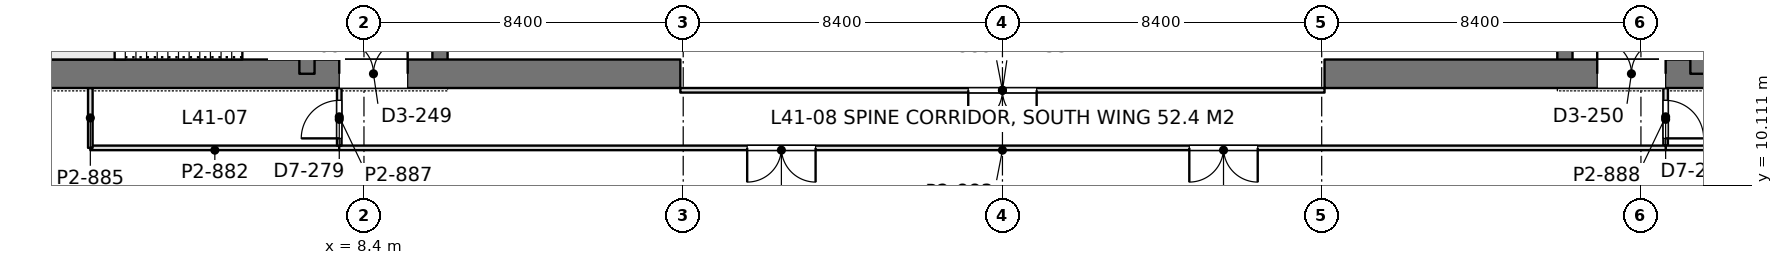
"""IFC4 building model, lengths in metres.
Left out: names, types, materials, properties, quantities, classifications, styles, units other than length and angle.
Written with IfcOpenShell. Run it as: python <this file> out.ifc"""

import sys

from ifc_helpers import new_model, si_unit, direction, frame, frame_2d, origin, place, context, subcontext, project, spatial, rectangle, extrude, element, fill, save


model = new_model("IFC4")
c1 = context("Model", 3, precision=1e-05, world=origin(), true_north=direction((0.0, 1.0)))
c2 = subcontext(c1, "Body", "Model", "MODEL_VIEW")
j1 = project(units=[si_unit("LENGTHUNIT", "METRE"), si_unit("PLANEANGLEUNIT", "RADIAN")], contexts=[c1])
p1 = place(None, origin())
s1 = spatial("IfcSite", under=j1, at=p1, CompositionType="ELEMENT")
p2 = place(p1, origin())
s2 = spatial("IfcBuilding", under=s1, at=p2, CompositionType="ELEMENT")
p3 = place(p2, frame((0.0, 0.0, 181.8)))
s3 = spatial("IfcBuildingStorey", under=s2, at=p3, CompositionType="ELEMENT", Elevation=181.8)
p4 = place(p3, frame((-1.125, 13.05, 0.0), z_axis=(0.0, 0.0, 1.0), x_axis=(1.0, 0.0, 0.0)))
e1 = element("IfcWall", 1, at=p4, inside=s3, PredefinedType="SHEAR", context=c2, shape_type="SweptSolid", body=[
    extrude(rectangle(XDim=17.85, YDim=0.75, at=frame_2d((8.925, 0.0))), origin(), (0.0, 0.0, 1.0), 4.2),
])
p5 = place(p4, frame((8.875, 0.0, 0.0)))
e2 = element("IfcOpeningElement", 2, at=p5, cuts=e1, PredefinedType="OPENING", context=c2, shape_type="SweptSolid", body=[
    extrude(rectangle(XDim=1.8, YDim=2.4, at=frame_2d((0.9, 1.2))), frame((0.0, 0.385, 0.0), z_axis=(0.0, -1.0, 0.0), x_axis=(1.0, 0.0, 0.0)), (0.0, 0.0, 1.0), 0.77),
])
p6 = place(p3, frame((6.9, 13.05, 0.0), z_axis=(0.0, 0.0, 1.0), x_axis=(0.0, 1.0, 0.0)))
e3 = element("IfcWall", 3, at=p6, inside=s3, PredefinedType="SHEAR", context=c2, shape_type="SweptSolid", body=[
    extrude(rectangle(XDim=24.3, YDim=0.4, at=frame_2d((12.15, 0.0))), origin(), (0.0, 0.0, 1.0), 4.2),
])
p7 = place(p6, frame((1.3, 0.0, 0.0)))
e4 = element("IfcOpeningElement", 4, at=p7, cuts=e3, PredefinedType="OPENING", context=c2, shape_type="SweptSolid", body=[
    extrude(rectangle(XDim=1.0, YDim=2.2, at=frame_2d((0.5, 1.1))), frame((0.0, 0.21, 0.0), z_axis=(0.0, -1.0, 0.0), x_axis=(1.0, 0.0, 0.0)), (0.0, 0.0, 1.0), 0.42),
])
p8 = place(p6, frame((22.0, 0.0, 0.0)))
e5 = element("IfcOpeningElement", 5, at=p8, cuts=e3, PredefinedType="OPENING", context=c2, shape_type="SweptSolid", body=[
    extrude(rectangle(XDim=1.0, YDim=2.2, at=frame_2d((0.5, 1.1))), frame((0.0, 0.21, 0.0), z_axis=(0.0, -1.0, 0.0), x_axis=(1.0, 0.0, 0.0)), (0.0, 0.0, 1.0), 0.42),
])
p9 = place(p6, frame((5.55, 0.0, 0.0)))
e6 = element("IfcOpeningElement", 6, at=p9, cuts=e3, PredefinedType="OPENING", context=c2, shape_type="SweptSolid", body=[
    extrude(rectangle(XDim=1.0, YDim=2.2, at=frame_2d((0.5, 1.1))), frame((0.0, 0.21, 0.0), z_axis=(0.0, -1.0, 0.0), x_axis=(1.0, 0.0, 0.0)), (0.0, 0.0, 1.0), 0.42),
])
p10 = place(p6, frame((9.55, 0.0, 0.0)))
e7 = element("IfcOpeningElement", 7, at=p10, cuts=e3, PredefinedType="OPENING", context=c2, shape_type="SweptSolid", body=[
    extrude(rectangle(XDim=1.0, YDim=2.2, at=frame_2d((0.5, 1.1))), frame((0.0, 0.21, 0.0), z_axis=(0.0, -1.0, 0.0), x_axis=(1.0, 0.0, 0.0)), (0.0, 0.0, 1.0), 0.42),
])
p11 = place(p6, frame((12.8, 0.0, 0.0)))
e8 = element("IfcOpeningElement", 8, at=p11, cuts=e3, PredefinedType="OPENING", context=c2, shape_type="SweptSolid", body=[
    extrude(rectangle(XDim=1.1, YDim=2.2, at=frame_2d((0.55, 1.1))), frame((0.0, 0.21, 0.0), z_axis=(0.0, -1.0, 0.0), x_axis=(1.0, 0.0, 0.0)), (0.0, 0.0, 1.0), 0.42),
])
p12 = place(p6, frame((15.538, 0.0, 0.0)))
e9 = element("IfcOpeningElement", 9, at=p12, cuts=e3, PredefinedType="OPENING", context=c2, shape_type="SweptSolid", body=[
    extrude(rectangle(XDim=1.1, YDim=2.2, at=frame_2d((0.55, 1.1))), frame((0.0, 0.21, 0.0), z_axis=(0.0, -1.0, 0.0), x_axis=(1.0, 0.0, 0.0)), (0.0, 0.0, 1.0), 0.42),
])
p13 = place(p6, frame((18.262, 0.0, 0.0)))
e10 = element("IfcOpeningElement", 10, at=p13, cuts=e3, PredefinedType="OPENING", context=c2, shape_type="SweptSolid", body=[
    extrude(rectangle(XDim=1.1, YDim=2.2, at=frame_2d((0.55, 1.1))), frame((0.0, 0.21, 0.0), z_axis=(0.0, -1.0, 0.0), x_axis=(1.0, 0.0, 0.0)), (0.0, 0.0, 1.0), 0.42),
])
p14 = place(p3, frame((10.4, 13.05, 0.0), z_axis=(0.0, 0.0, 1.0), x_axis=(0.0, 1.0, 0.0)))
e11 = element("IfcWall", 11, at=p14, inside=s3, PredefinedType="SHEAR", context=c2, shape_type="SweptSolid", body=[
    extrude(rectangle(XDim=24.3, YDim=0.4, at=frame_2d((12.15, 0.0))), origin(), (0.0, 0.0, 1.0), 4.2),
])
p15 = place(p14, frame((15.75, 0.0, 0.0)))
e12 = element("IfcOpeningElement", 12, at=p15, cuts=e11, PredefinedType="OPENING", context=c2, shape_type="SweptSolid", body=[
    extrude(rectangle(XDim=1.1, YDim=2.2, at=frame_2d((0.55, 1.1))), frame((0.0, 0.21, 0.0), z_axis=(0.0, -1.0, 0.0), x_axis=(1.0, 0.0, 0.0)), (0.0, 0.0, 1.0), 0.42),
])
p16 = place(p14, frame((18.6, 0.0, 0.0)))
e13 = element("IfcOpeningElement", 13, at=p16, cuts=e11, PredefinedType="OPENING", context=c2, shape_type="SweptSolid", body=[
    extrude(rectangle(XDim=1.1, YDim=2.2, at=frame_2d((0.55, 1.1))), frame((0.0, 0.21, 0.0), z_axis=(0.0, -1.0, 0.0), x_axis=(1.0, 0.0, 0.0)), (0.0, 0.0, 1.0), 0.42),
])
p17 = place(p14, frame((21.45, 0.0, 0.0)))
e14 = element("IfcOpeningElement", 14, at=p17, cuts=e11, PredefinedType="OPENING", context=c2, shape_type="SweptSolid", body=[
    extrude(rectangle(XDim=1.1, YDim=2.2, at=frame_2d((0.55, 1.1))), frame((0.0, 0.21, 0.0), z_axis=(0.0, -1.0, 0.0), x_axis=(1.0, 0.0, 0.0)), (0.0, 0.0, 1.0), 0.42),
])
p18 = place(p14, frame((8.65, 0.0, 0.0)))
e15 = element("IfcOpeningElement", 15, at=p18, cuts=e11, PredefinedType="OPENING", context=c2, shape_type="SweptSolid", body=[
    extrude(rectangle(XDim=1.8, YDim=2.4, at=frame_2d((0.9, 1.2))), frame((0.0, 0.21, 0.0), z_axis=(0.0, -1.0, 0.0), x_axis=(1.0, 0.0, 0.0)), (0.0, 0.0, 1.0), 0.42),
])
p19 = place(p3, frame((33.675, 13.05, 0.0), z_axis=(0.0, 0.0, 1.0), x_axis=(1.0, 0.0, 0.0)))
e16 = element("IfcWall", 16, at=p19, inside=s3, PredefinedType="SHEAR", context=c2, shape_type="SweptSolid", body=[
    extrude(rectangle(XDim=17.85, YDim=0.75, at=frame_2d((8.925, 0.0))), origin(), (0.0, 0.0, 1.0), 4.2),
])
p20 = place(p19, frame((7.175, 0.0, 0.0)))
e17 = element("IfcOpeningElement", 17, at=p20, cuts=e16, PredefinedType="OPENING", context=c2, shape_type="SweptSolid", body=[
    extrude(rectangle(XDim=1.8, YDim=2.4, at=frame_2d((0.9, 1.2))), frame((0.0, 0.385, 0.0), z_axis=(0.0, -1.0, 0.0), x_axis=(1.0, 0.0, 0.0)), (0.0, 0.0, 1.0), 0.77),
])
p21 = place(p3, frame((43.5, 13.05, 0.0), z_axis=(0.0, 0.0, 1.0), x_axis=(0.0, 1.0, 0.0)))
e18 = element("IfcWall", 18, at=p21, inside=s3, PredefinedType="SHEAR", context=c2, shape_type="SweptSolid", body=[
    extrude(rectangle(XDim=24.3, YDim=0.4, at=frame_2d((12.15, 0.0))), origin(), (0.0, 0.0, 1.0), 4.2),
])
p22 = place(p21, frame((1.3, 0.0, 0.0)))
e19 = element("IfcOpeningElement", 19, at=p22, cuts=e18, PredefinedType="OPENING", context=c2, shape_type="SweptSolid", body=[
    extrude(rectangle(XDim=1.0, YDim=2.2, at=frame_2d((0.5, 1.1))), frame((0.0, 0.21, 0.0), z_axis=(0.0, -1.0, 0.0), x_axis=(1.0, 0.0, 0.0)), (0.0, 0.0, 1.0), 0.42),
])
p23 = place(p21, frame((22.0, 0.0, 0.0)))
e20 = element("IfcOpeningElement", 20, at=p23, cuts=e18, PredefinedType="OPENING", context=c2, shape_type="SweptSolid", body=[
    extrude(rectangle(XDim=1.0, YDim=2.2, at=frame_2d((0.5, 1.1))), frame((0.0, 0.21, 0.0), z_axis=(0.0, -1.0, 0.0), x_axis=(1.0, 0.0, 0.0)), (0.0, 0.0, 1.0), 0.42),
])
p24 = place(p21, frame((5.55, 0.0, 0.0)))
e21 = element("IfcOpeningElement", 21, at=p24, cuts=e18, PredefinedType="OPENING", context=c2, shape_type="SweptSolid", body=[
    extrude(rectangle(XDim=1.0, YDim=2.2, at=frame_2d((0.5, 1.1))), frame((0.0, 0.21, 0.0), z_axis=(0.0, -1.0, 0.0), x_axis=(1.0, 0.0, 0.0)), (0.0, 0.0, 1.0), 0.42),
])
p25 = place(p21, frame((9.55, 0.0, 0.0)))
e22 = element("IfcOpeningElement", 22, at=p25, cuts=e18, PredefinedType="OPENING", context=c2, shape_type="SweptSolid", body=[
    extrude(rectangle(XDim=1.0, YDim=2.2, at=frame_2d((0.5, 1.1))), frame((0.0, 0.21, 0.0), z_axis=(0.0, -1.0, 0.0), x_axis=(1.0, 0.0, 0.0)), (0.0, 0.0, 1.0), 0.42),
])
p26 = place(p21, frame((12.8, 0.0, 0.0)))
e23 = element("IfcOpeningElement", 23, at=p26, cuts=e18, PredefinedType="OPENING", context=c2, shape_type="SweptSolid", body=[
    extrude(rectangle(XDim=1.1, YDim=2.2, at=frame_2d((0.55, 1.1))), frame((0.0, 0.21, 0.0), z_axis=(0.0, -1.0, 0.0), x_axis=(1.0, 0.0, 0.0)), (0.0, 0.0, 1.0), 0.42),
])
p27 = place(p21, frame((15.538, 0.0, 0.0)))
e24 = element("IfcOpeningElement", 24, at=p27, cuts=e18, PredefinedType="OPENING", context=c2, shape_type="SweptSolid", body=[
    extrude(rectangle(XDim=1.1, YDim=2.2, at=frame_2d((0.55, 1.1))), frame((0.0, 0.21, 0.0), z_axis=(0.0, -1.0, 0.0), x_axis=(1.0, 0.0, 0.0)), (0.0, 0.0, 1.0), 0.42),
])
p28 = place(p21, frame((18.262, 0.0, 0.0)))
e25 = element("IfcOpeningElement", 25, at=p28, cuts=e18, PredefinedType="OPENING", context=c2, shape_type="SweptSolid", body=[
    extrude(rectangle(XDim=1.1, YDim=2.2, at=frame_2d((0.55, 1.1))), frame((0.0, 0.21, 0.0), z_axis=(0.0, -1.0, 0.0), x_axis=(1.0, 0.0, 0.0)), (0.0, 0.0, 1.0), 0.42),
])
p29 = place(p3, frame((40.0, 13.05, 0.0), z_axis=(0.0, 0.0, 1.0), x_axis=(0.0, 1.0, 0.0)))
e26 = element("IfcWall", 26, at=p29, inside=s3, PredefinedType="SHEAR", context=c2, shape_type="SweptSolid", body=[
    extrude(rectangle(XDim=24.3, YDim=0.4, at=frame_2d((12.15, 0.0))), origin(), (0.0, 0.0, 1.0), 4.2),
])
p30 = place(p29, frame((15.75, 0.0, 0.0)))
e27 = element("IfcOpeningElement", 27, at=p30, cuts=e26, PredefinedType="OPENING", context=c2, shape_type="SweptSolid", body=[
    extrude(rectangle(XDim=1.1, YDim=2.2, at=frame_2d((0.55, 1.1))), frame((0.0, 0.21, 0.0), z_axis=(0.0, -1.0, 0.0), x_axis=(1.0, 0.0, 0.0)), (0.0, 0.0, 1.0), 0.42),
])
p31 = place(p29, frame((18.6, 0.0, 0.0)))
e28 = element("IfcOpeningElement", 28, at=p31, cuts=e26, PredefinedType="OPENING", context=c2, shape_type="SweptSolid", body=[
    extrude(rectangle(XDim=1.1, YDim=2.2, at=frame_2d((0.55, 1.1))), frame((0.0, 0.21, 0.0), z_axis=(0.0, -1.0, 0.0), x_axis=(1.0, 0.0, 0.0)), (0.0, 0.0, 1.0), 0.42),
])
p32 = place(p29, frame((21.45, 0.0, 0.0)))
e29 = element("IfcOpeningElement", 29, at=p32, cuts=e26, PredefinedType="OPENING", context=c2, shape_type="SweptSolid", body=[
    extrude(rectangle(XDim=1.1, YDim=2.2, at=frame_2d((0.55, 1.1))), frame((0.0, 0.21, 0.0), z_axis=(0.0, -1.0, 0.0), x_axis=(1.0, 0.0, 0.0)), (0.0, 0.0, 1.0), 0.42),
])
p33 = place(p29, frame((8.65, 0.0, 0.0)))
e30 = element("IfcOpeningElement", 30, at=p33, cuts=e26, PredefinedType="OPENING", context=c2, shape_type="SweptSolid", body=[
    extrude(rectangle(XDim=1.8, YDim=2.4, at=frame_2d((0.9, 1.2))), frame((0.0, 0.21, 0.0), z_axis=(0.0, -1.0, 0.0), x_axis=(1.0, 0.0, 0.0)), (0.0, 0.0, 1.0), 0.42),
])
p34 = place(p3, frame((7.748, 11.1, 0.0), z_axis=(0.0, 0.0, 1.0), x_axis=(1.0, 0.0, 0.0)))
e31 = element("IfcWall", 31, at=p34, inside=s3, PredefinedType="PARTITIONING", context=c2, shape_type="SweptSolid", body=[
    extrude(rectangle(XDim=34.904, YDim=0.12, at=frame_2d((17.452, 0.0))), origin(), (0.0, 0.0, 1.0), 3.55),
])
p35 = place(p34, frame((10.735, 0.0, 0.0)))
e32 = element("IfcOpeningElement", 32, at=p35, cuts=e31, PredefinedType="OPENING", context=c2, shape_type="SweptSolid", body=[
    extrude(rectangle(XDim=1.8, YDim=2.2, at=frame_2d((0.9, 1.1))), frame((0.0, 0.07, 0.0), z_axis=(0.0, -1.0, 0.0), x_axis=(1.0, 0.0, 0.0)), (0.0, 0.0, 1.0), 0.14),
])
p36 = place(p34, frame((22.369, 0.0, 0.0)))
e33 = element("IfcOpeningElement", 33, at=p36, cuts=e31, PredefinedType="OPENING", context=c2, shape_type="SweptSolid", body=[
    extrude(rectangle(XDim=1.8, YDim=2.2, at=frame_2d((0.9, 1.1))), frame((0.0, 0.07, 0.0), z_axis=(0.0, -1.0, 0.0), x_axis=(1.0, 0.0, 0.0)), (0.0, 0.0, 1.0), 0.14),
])
p37 = place(p3, frame((7.75, 11.158, 0.0), z_axis=(0.0, 0.0, 1.0), x_axis=(0.0, 1.0, 0.0)))
e34 = element("IfcWall", 34, at=p37, inside=s3, PredefinedType="PARTITIONING", context=c2, shape_type="SweptSolid", body=[
    extrude(rectangle(XDim=1.518, YDim=0.12, at=frame_2d((0.759, 0.0))), origin(), (0.0, 0.0, 1.0), 4.05),
])
p38 = place(p37, frame((0.192, 0.0, 0.0)))
e35 = element("IfcOpeningElement", 35, at=p38, cuts=e34, PredefinedType="OPENING", context=c2, shape_type="SweptSolid", body=[
    extrude(rectangle(XDim=1.0, YDim=2.4, at=frame_2d((0.5, 1.2))), frame((0.0, 0.07, 0.0), z_axis=(0.0, -1.0, 0.0), x_axis=(1.0, 0.0, 0.0)), (0.0, 0.0, 1.0), 0.14),
])
p39 = place(p3, frame((42.65, 11.158, 0.0), z_axis=(0.0, 0.0, 1.0), x_axis=(0.0, 1.0, 0.0)))
e36 = element("IfcWall", 36, at=p39, inside=s3, PredefinedType="PARTITIONING", context=c2, shape_type="SweptSolid", body=[
    extrude(rectangle(XDim=1.518, YDim=0.12, at=frame_2d((0.759, 0.0))), origin(), (0.0, 0.0, 1.0), 4.05),
])
p40 = place(p39, frame((0.192, 0.0, 0.0)))
e37 = element("IfcOpeningElement", 37, at=p40, cuts=e36, PredefinedType="OPENING", context=c2, shape_type="SweptSolid", body=[
    extrude(rectangle(XDim=1.0, YDim=2.4, at=frame_2d((0.5, 1.2))), frame((0.0, 0.07, 0.0), z_axis=(0.0, -1.0, 0.0), x_axis=(1.0, 0.0, 0.0)), (0.0, 0.0, 1.0), 0.14),
])
p41 = place(p3, frame((1.2, 11.1, 0.0), z_axis=(0.0, 0.0, 1.0), x_axis=(1.0, 0.0, 0.0)))
e38 = element("IfcWall", 38, at=p41, inside=s3, PredefinedType="PARTITIONING", context=c2, shape_type="SweptSolid", body=[
    extrude(rectangle(XDim=6.552, YDim=0.12, at=frame_2d((3.276, 0.0))), origin(), (0.0, 0.0, 1.0), 4.05),
])
p42 = place(p3, frame((1.2, 11.1, 0.0), z_axis=(0.0, 0.0, 1.0), x_axis=(0.0, 1.0, 0.0)))
e39 = element("IfcWall", 39, at=p42, inside=s3, PredefinedType="PARTITIONING", context=c2, shape_type="SweptSolid", body=[
    extrude(rectangle(XDim=1.576, YDim=0.12, at=frame_2d((0.788, 0.0))), origin(), (0.0, 0.0, 1.0), 4.05),
])
p43 = place(p3, frame((42.648, 11.1, 0.0), z_axis=(0.0, 0.0, 1.0), x_axis=(1.0, 0.0, 0.0)))
e40 = element("IfcWall", 40, at=p43, inside=s3, PredefinedType="PARTITIONING", context=c2, shape_type="SweptSolid", body=[
    extrude(rectangle(XDim=6.552, YDim=0.12, at=frame_2d((3.276, 0.0))), origin(), (0.0, 0.0, 1.0), 4.05),
])
p44 = place(p3, frame((16.725, 12.615, 0.0), z_axis=(0.0, 0.0, 1.0), x_axis=(1.0, 0.0, 0.0)))
e41 = element("IfcWall", 41, at=p44, inside=s3, PredefinedType="PARTITIONING", context=c2, shape_type="SweptSolid", body=[
    extrude(rectangle(XDim=16.95, YDim=0.12, at=frame_2d((8.475, 0.0))), origin(), (0.0, 0.0, 1.0), 3.55),
])
p45 = place(p44, frame((7.575, 0.0, 0.0)))
e42 = element("IfcOpeningElement", 42, at=p45, cuts=e41, PredefinedType="OPENING", context=c2, shape_type="SweptSolid", body=[
    extrude(rectangle(XDim=1.8, YDim=2.2, at=frame_2d((0.9, 1.1))), frame((0.0, 0.07, 0.0), z_axis=(0.0, -1.0, 0.0), x_axis=(1.0, 0.0, 0.0)), (0.0, 0.0, 1.0), 0.14),
])
p46 = place(p5, origin())
e43 = element("IfcDoor", 43, at=p46, inside=s3, OperationType="DOUBLE_DOOR_SINGLE_SWING", PredefinedType="DOOR", context=c2, shape_type="SweptSolid", body=[
    extrude(rectangle(XDim=1.8, YDim=2.4, at=frame_2d((0.9, 1.2))), frame((0.0, 0.025, 0.0), z_axis=(0.0, -1.0, 0.0), x_axis=(1.0, 0.0, 0.0)), (0.0, 0.0, 1.0), 0.05),
])
fill(e2, e43)
p47 = place(p20, origin())
e44 = element("IfcDoor", 44, at=p47, inside=s3, OperationType="DOUBLE_DOOR_SINGLE_SWING", PredefinedType="DOOR", context=c2, shape_type="SweptSolid", body=[
    extrude(rectangle(XDim=1.8, YDim=2.4, at=frame_2d((0.9, 1.2))), frame((0.0, 0.025, 0.0), z_axis=(0.0, -1.0, 0.0), x_axis=(1.0, 0.0, 0.0)), (0.0, 0.0, 1.0), 0.05),
])
fill(e17, e44)
p48 = place(p35, frame((1.8, 0.0, 0.0), z_axis=(0.0, 0.0, 1.0), x_axis=(-1.0, 0.0, 0.0)))
e45 = element("IfcDoor", 45, at=p48, inside=s3, OperationType="DOUBLE_DOOR_SINGLE_SWING", PredefinedType="DOOR", context=c2, shape_type="SweptSolid", body=[
    extrude(rectangle(XDim=1.8, YDim=2.2, at=frame_2d((0.9, 1.1))), frame((0.0, 0.025, 0.0), z_axis=(0.0, -1.0, 0.0), x_axis=(1.0, 0.0, 0.0)), (0.0, 0.0, 1.0), 0.05),
])
fill(e32, e45)
p49 = place(p36, frame((1.8, 0.0, 0.0), z_axis=(0.0, 0.0, 1.0), x_axis=(-1.0, 0.0, 0.0)))
e46 = element("IfcDoor", 46, at=p49, inside=s3, OperationType="DOUBLE_DOOR_SINGLE_SWING", PredefinedType="DOOR", context=c2, shape_type="SweptSolid", body=[
    extrude(rectangle(XDim=1.8, YDim=2.2, at=frame_2d((0.9, 1.1))), frame((0.0, 0.025, 0.0), z_axis=(0.0, -1.0, 0.0), x_axis=(1.0, 0.0, 0.0)), (0.0, 0.0, 1.0), 0.05),
])
fill(e33, e46)
p50 = place(p38, origin())
e47 = element("IfcDoor", 47, at=p50, inside=s3, OperationType="SINGLE_SWING_LEFT", PredefinedType="DOOR", context=c2, shape_type="SweptSolid", body=[
    extrude(rectangle(XDim=1.0, YDim=2.4, at=frame_2d((0.5, 1.2))), frame((0.0, 0.025, 0.0), z_axis=(0.0, -1.0, 0.0), x_axis=(1.0, 0.0, 0.0)), (0.0, 0.0, 1.0), 0.05),
])
fill(e35, e47)
p51 = place(p40, frame((1.0, 0.0, 0.0), z_axis=(0.0, 0.0, 1.0), x_axis=(-1.0, 0.0, 0.0)))
e48 = element("IfcDoor", 48, at=p51, inside=s3, OperationType="SINGLE_SWING_RIGHT", PredefinedType="DOOR", context=c2, shape_type="SweptSolid", body=[
    extrude(rectangle(XDim=1.0, YDim=2.4, at=frame_2d((0.5, 1.2))), frame((0.0, 0.025, 0.0), z_axis=(0.0, -1.0, 0.0), x_axis=(1.0, 0.0, 0.0)), (0.0, 0.0, 1.0), 0.05),
])
fill(e37, e48)
p52 = place(p45, frame((1.8, 0.0, 0.0), z_axis=(0.0, 0.0, 1.0), x_axis=(-1.0, 0.0, 0.0)))
e49 = element("IfcDoor", 49, at=p52, inside=s3, OperationType="DOUBLE_DOOR_SINGLE_SWING", PredefinedType="DOOR", context=c2, shape_type="SweptSolid", body=[
    extrude(rectangle(XDim=1.8, YDim=2.2, at=frame_2d((0.9, 1.1))), frame((0.0, 0.025, 0.0), z_axis=(0.0, -1.0, 0.0), x_axis=(1.0, 0.0, 0.0)), (0.0, 0.0, 1.0), 0.05),
])
fill(e42, e49)
save(model, sys.argv[1])
